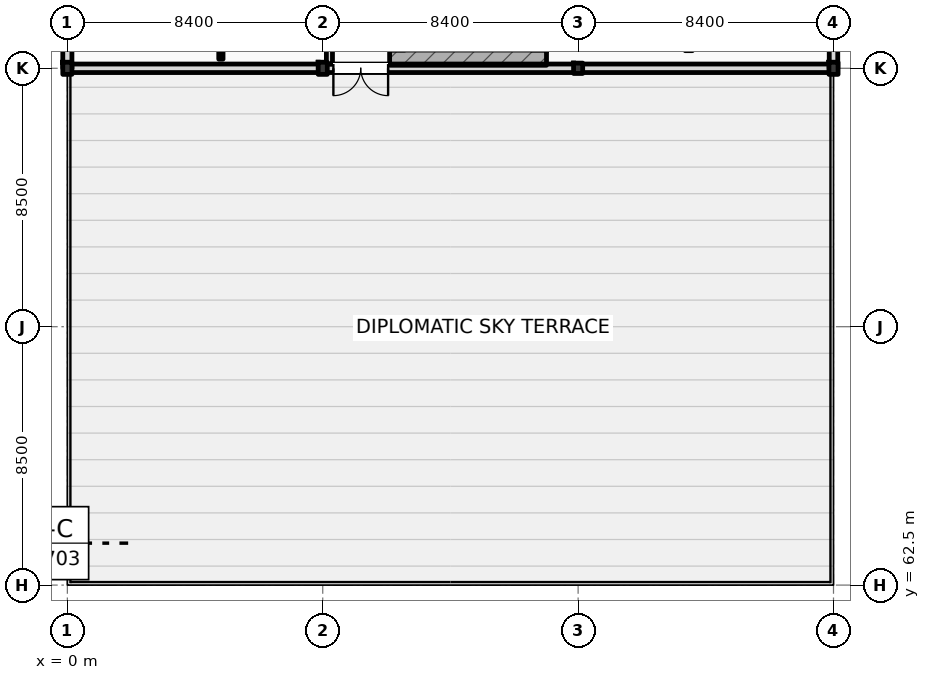
"""IFC4 building model, lengths in metres.
Left out: names, types, materials, properties, quantities, classifications, styles, units other than length and angle.
Written with IfcOpenShell. Run it as: python <this file> out.ifc"""

import sys

from ifc_helpers import new_model, si_unit, direction, frame, frame_2d, origin, origin_2d, place, context, subcontext, project, spatial, rectangle, i_section, extrude, element, fill, save


model = new_model("IFC4")
c1 = context("Model", 3, precision=1e-05, world=origin(), true_north=direction((0.0, 1.0)))
c2 = subcontext(c1, "Body", "Model", "MODEL_VIEW")
j1 = project(units=[si_unit("LENGTHUNIT", "METRE"), si_unit("PLANEANGLEUNIT", "RADIAN")], contexts=[c1])
p1 = place(None, origin())
s1 = spatial("IfcSite", under=j1, at=p1, CompositionType="ELEMENT")
p2 = place(p1, origin())
s2 = spatial("IfcBuilding", under=s1, at=p2, CompositionType="ELEMENT")
p3 = place(p2, frame((0.0, 0.0, 42.6)))
s3 = spatial("IfcBuildingStorey", under=s2, at=p3, CompositionType="ELEMENT", Elevation=42.6)
for number, where, z_axis, x_axis in (
    (1, (0.0, 79.5, 0.0), (0.0, 0.0, 1.0), (1.0, 0.0, 0.0)),
    (2, (8.4, 79.5, 0.0), (0.0, 0.0, 1.0), (1.0, 0.0, 0.0)),
):
    element("IfcColumn", number, at=place(p3, frame(where, z_axis=z_axis, x_axis=x_axis)), inside=s3, PredefinedType="COLUMN", context=c2, shape_type="SweptSolid", body=[
        extrude(i_section(OverallWidth=0.3, OverallDepth=0.4, WebThickness=0.013, FlangeThickness=0.024, FilletRadius=0.027, at=origin_2d()), origin(), (0.0, 0.0, 1.0), 4.2),
    ])
p4 = place(p3, frame((16.8, 79.5, 0.0), z_axis=(0.0, 0.0, 1.0), x_axis=(1.0, 0.0, 0.0)))
e3 = element("IfcColumn", 3, at=p4, inside=s3, PredefinedType="COLUMN", context=c2, shape_type="SweptSolid", body=[
    extrude(i_section(OverallWidth=0.3, OverallDepth=0.34, WebThickness=0.012, FlangeThickness=0.021, FilletRadius=0.027, at=origin_2d()), origin(), (0.0, 0.0, 1.0), 4.2),
])
p5 = place(p3, frame((25.2, 79.5, 0.0), z_axis=(0.0, 0.0, 1.0), x_axis=(1.0, 0.0, 0.0)))
e4 = element("IfcColumn", 4, at=p5, inside=s3, PredefinedType="COLUMN", context=c2, shape_type="SweptSolid", body=[
    extrude(i_section(OverallWidth=0.3, OverallDepth=0.4, WebThickness=0.013, FlangeThickness=0.024, FilletRadius=0.027, at=origin_2d()), origin(), (0.0, 0.0, 1.0), 4.2),
])
p6 = place(p3, frame((10.6, 79.85, 0.0), z_axis=(0.0, 0.0, 1.0), x_axis=(1.0, 0.0, 0.0)))
e5 = element("IfcWall", 5, at=p6, inside=s3, PredefinedType="SHEAR", context=c2, shape_type="SweptSolid", body=[
    extrude(rectangle(XDim=5.16, YDim=0.5, at=frame_2d((2.58, 0.0))), origin(), (0.0, 0.0, 1.0), 4.2),
])
p7 = place(p3, frame((0.0, 79.5, 0.0), z_axis=(0.0, 0.0, 1.0), x_axis=(0.0, 1.0, 0.0)))
e6 = element("IfcWall", 6, at=p7, inside=s3, PredefinedType="STANDARD", context=c2, shape_type="SweptSolid", body=[
    extrude(rectangle(XDim=8.5, YDim=0.3, at=frame_2d((4.25, 0.0))), origin(), (0.0, 0.0, 1.0), 3.57),
])
p8 = place(p7, frame((2.075, 0.0, 0.9)))
e7 = element("IfcOpeningElement", 7, at=p8, cuts=e6, PredefinedType="OPENING", context=c2, shape_type="SweptSolid", body=[
    extrude(rectangle(XDim=1.5, YDim=2.49, at=frame_2d((0.75, 1.245))), frame((0.0, 0.16, 0.0), z_axis=(0.0, -1.0, 0.0), x_axis=(1.0, 0.0, 0.0)), (0.0, 0.0, 1.0), 0.32),
])
p9 = place(p7, frame((6.2, 0.0, 0.9)))
e8 = element("IfcOpeningElement", 8, at=p9, cuts=e6, PredefinedType="OPENING", context=c2, shape_type="SweptSolid", body=[
    extrude(rectangle(XDim=1.5, YDim=2.49, at=frame_2d((0.75, 1.245))), frame((0.0, 0.16, 0.0), z_axis=(0.0, -1.0, 0.0), x_axis=(1.0, 0.0, 0.0)), (0.0, 0.0, 1.0), 0.32),
])
p10 = place(p3, frame((0.0, 79.5, 0.0), z_axis=(0.0, 0.0, 1.0), x_axis=(1.0, 0.0, 0.0)))
e9 = element("IfcWall", 9, at=p10, inside=s3, PredefinedType="STANDARD", context=c2, shape_type="SweptSolid", body=[
    extrude(rectangle(XDim=25.2, YDim=0.28, at=frame_2d((12.6, 0.0))), origin(), (0.0, 0.0, 1.0), 3.38),
])
p11 = place(p10, frame((8.75, 0.0, 0.0)))
e10 = element("IfcOpeningElement", 10, at=p11, cuts=e9, PredefinedType="OPENING", context=c2, shape_type="SweptSolid", body=[
    extrude(rectangle(XDim=1.8, YDim=2.4, at=frame_2d((0.9, 1.2))), frame((0.0, 0.15, 0.0), z_axis=(0.0, -1.0, 0.0), x_axis=(1.0, 0.0, 0.0)), (0.0, 0.0, 1.0), 0.3),
])
p12 = place(p3, frame((25.2, 79.5, 0.0), z_axis=(0.0, 0.0, 1.0), x_axis=(0.0, 1.0, 0.0)))
e11 = element("IfcWall", 11, at=p12, inside=s3, PredefinedType="STANDARD", context=c2, shape_type="SweptSolid", body=[
    extrude(rectangle(XDim=16.5, YDim=0.28, at=frame_2d((8.25, 0.0))), origin(), (0.0, 0.0, 1.0), 3.57),
])
p13 = place(p3, frame((8.62, 79.64, 0.0), z_axis=(0.0, 0.0, 1.0), x_axis=(0.0, 1.0, 0.0)))
e12 = element("IfcWall", 12, at=p13, inside=s3, PredefinedType="PARTITIONING", context=c2, shape_type="SweptSolid", body=[
    extrude(rectangle(XDim=15.66, YDim=0.2, at=frame_2d((7.83, 0.0))), origin(), (0.0, 0.0, 1.0), 3.57),
])
p14 = place(p13, frame((3.28, 0.0, 0.0)))
e13 = element("IfcOpeningElement", 13, at=p14, cuts=e12, PredefinedType="OPENING", context=c2, shape_type="SweptSolid", body=[
    extrude(rectangle(XDim=0.96, YDim=2.2, at=frame_2d((0.48, 1.1))), frame((0.0, 0.11, 0.0), z_axis=(0.0, -1.0, 0.0), x_axis=(1.0, 0.0, 0.0)), (0.0, 0.0, 1.0), 0.22),
])
p15 = place(p13, frame((6.034, 0.0, 0.0)))
e14 = element("IfcOpeningElement", 14, at=p15, cuts=e12, PredefinedType="OPENING", context=c2, shape_type="SweptSolid", body=[
    extrude(rectangle(XDim=0.96, YDim=2.2, at=frame_2d((0.48, 1.1))), frame((0.0, 0.11, 0.0), z_axis=(0.0, -1.0, 0.0), x_axis=(1.0, 0.0, 0.0)), (0.0, 0.0, 1.0), 0.22),
])
p16 = place(p13, frame((13.61, 0.0, 0.0)))
e15 = element("IfcOpeningElement", 15, at=p16, cuts=e12, PredefinedType="OPENING", context=c2, shape_type="SweptSolid", body=[
    extrude(rectangle(XDim=0.96, YDim=2.2, at=frame_2d((0.48, 1.1))), frame((0.0, 0.11, 0.0), z_axis=(0.0, -1.0, 0.0), x_axis=(1.0, 0.0, 0.0)), (0.0, 0.0, 1.0), 0.22),
])
p17 = place(p3, frame((5.05, 79.8, 0.0), z_axis=(0.0, 0.0, 1.0), x_axis=(0.0, 1.0, 0.0)))
e16 = element("IfcWall", 16, at=p17, inside=s3, PredefinedType="PARTITIONING", context=c2, shape_type="SweptSolid", body=[
    extrude(rectangle(XDim=2.15, YDim=0.14, at=frame_2d((1.075, 0.0))), origin(), (0.0, 0.0, 1.0), 3.94),
])
p18 = place(p17, frame((0.625, 0.0, 0.0)))
e17 = element("IfcOpeningElement", 17, at=p18, cuts=e16, PredefinedType="OPENING", context=c2, shape_type="SweptSolid", body=[
    extrude(rectangle(XDim=0.9, YDim=2.1, at=frame_2d((0.45, 1.05))), frame((0.0, 0.08, 0.0), z_axis=(0.0, -1.0, 0.0), x_axis=(1.0, 0.0, 0.0)), (0.0, 0.0, 1.0), 0.16),
])
p19 = place(p11, frame((1.8, 0.0, 0.0), z_axis=(0.0, 0.0, 1.0), x_axis=(-1.0, 0.0, 0.0)))
e18 = element("IfcDoor", 18, at=p19, inside=s3, OperationType="DOUBLE_SWING_LEFT", PredefinedType="DOOR", context=c2, shape_type="SweptSolid", body=[
    extrude(rectangle(XDim=1.8, YDim=2.4, at=frame_2d((0.9, 1.2))), frame((0.0, 0.025, 0.0), z_axis=(0.0, -1.0, 0.0), x_axis=(1.0, 0.0, 0.0)), (0.0, 0.0, 1.0), 0.05),
])
fill(e10, e18)
save(model, sys.argv[1])
